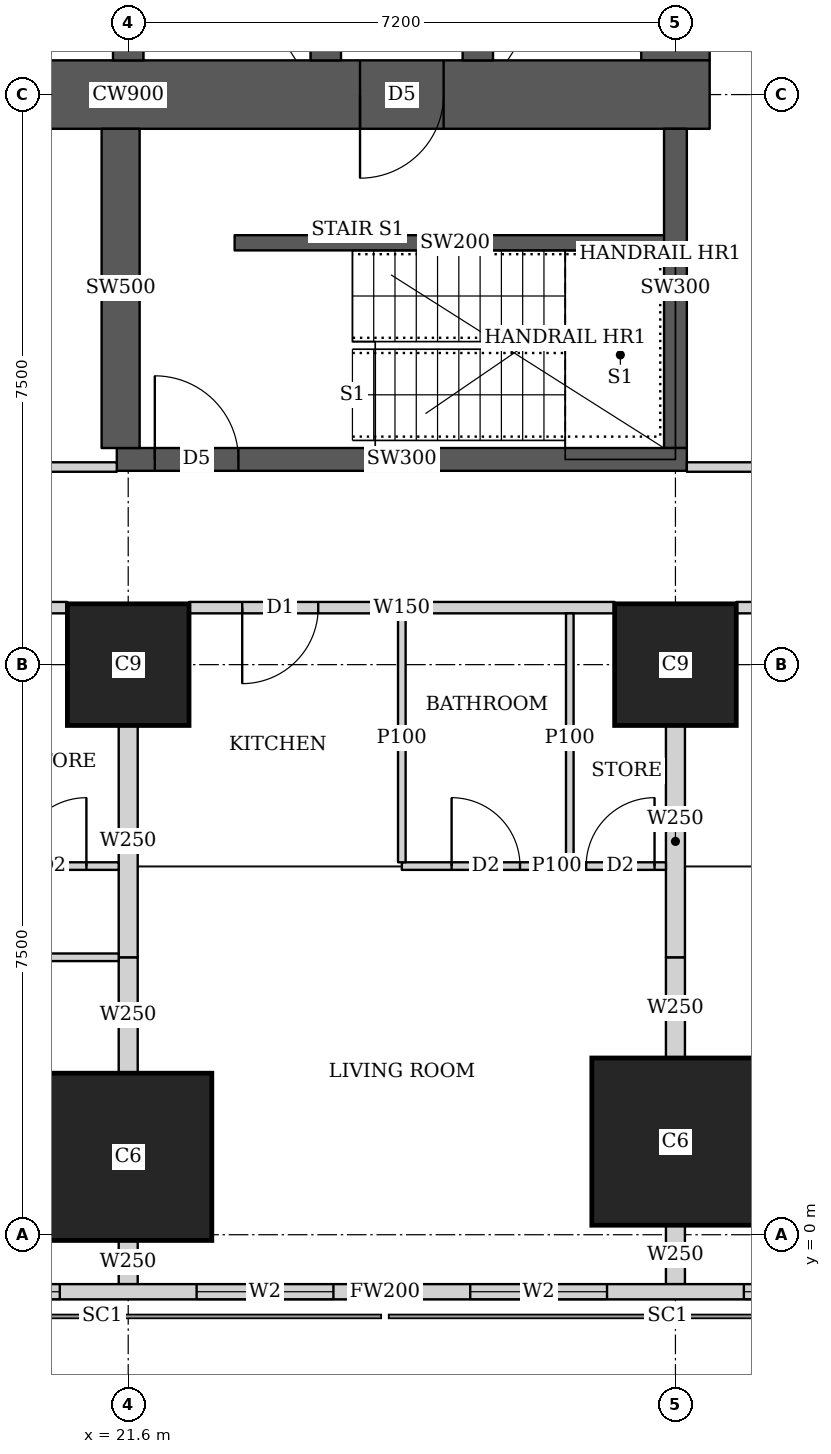
"""IFC4 building model, lengths in metres.
Left out: names, types, materials, properties, quantities, classifications, styles, units other than length and angle.
Written with IfcOpenShell. Run it as: python <this file> out.ifc"""

import sys

from ifc_helpers import new_model, si_unit, direction, frame, frame_2d, origin, origin_2d, place, context, subcontext, project, spatial, rectangle, extrude, element, fill, save


model = new_model("IFC4")
c1 = context("Model", 3, precision=1e-05, world=origin(), true_north=direction((0.0, 1.0)))
c2 = subcontext(c1, "Body", "Model", "MODEL_VIEW")
j1 = project(units=[si_unit("LENGTHUNIT", "METRE"), si_unit("PLANEANGLEUNIT", "RADIAN")], contexts=[c1])
p1 = place(None, origin())
s1 = spatial("IfcSite", under=j1, at=p1, CompositionType="ELEMENT")
p2 = place(p1, origin())
s2 = spatial("IfcBuilding", under=s1, at=p2, CompositionType="ELEMENT")
p3 = place(p2, frame((0.0, 0.0, 122.9)))
s3 = spatial("IfcBuildingStorey", under=s2, at=p3, CompositionType="ELEMENT", Elevation=122.9)
for number, where, z_axis, x_axis in (
    (1, (21.6, 1.025, 0.0), (0.0, 0.0, 1.0), (1.0, 0.0, 0.0)),
    (2, (28.8, 1.225, 0.0), (0.0, 0.0, 1.0), (1.0, 0.0, 0.0)),
):
    element("IfcColumn", number, at=place(p3, frame(where, z_axis=z_axis, x_axis=x_axis)), inside=s3, PredefinedType="COLUMN", context=c2, shape_type="SweptSolid", body=[
        extrude(rectangle(XDim=2.2, YDim=2.2, at=origin_2d()), origin(), (0.0, 0.0, 1.0), 3.75),
    ])
for number, where, z_axis, x_axis in (
    (3, (21.6, 7.5, 0.0), (0.0, 0.0, 1.0), (1.0, 0.0, 0.0)),
    (4, (28.8, 7.5, 0.0), (0.0, 0.0, 1.0), (1.0, 0.0, 0.0)),
):
    element("IfcColumn", number, at=place(p3, frame(where, z_axis=z_axis, x_axis=x_axis)), inside=s3, PredefinedType="COLUMN", context=c2, shape_type="SweptSolid", body=[
        extrude(rectangle(XDim=1.6, YDim=1.6, at=origin_2d()), origin(), (0.0, 0.0, 1.0), 3.75),
    ])
p4 = place(p3, frame((13.95, 15.0, 0.0), z_axis=(0.0, 0.0, 1.0), x_axis=(1.0, 0.0, 0.0)))
e5 = element("IfcWall", 5, at=p4, inside=s3, PredefinedType="SHEAR", context=c2, shape_type="SweptSolid", body=[
    extrude(rectangle(XDim=15.3, YDim=0.9, at=frame_2d((7.65, 0.0))), origin(), (0.0, 0.0, 1.0), 3.75),
])
p5 = place(p4, frame((4.45, 0.0, 0.0)))
e6 = element("IfcOpeningElement", 6, at=p5, cuts=e5, PredefinedType="OPENING", context=c2, shape_type="SweptSolid", body=[
    extrude(rectangle(XDim=1.8, YDim=2.1, at=frame_2d((0.9, 1.05))), frame((0.0, 0.46, 0.0), z_axis=(0.0, -1.0, 0.0), x_axis=(1.0, 0.0, 0.0)), (0.0, 0.0, 1.0), 0.92),
])
p6 = place(p4, frame((10.7, 0.0, 0.0)))
e7 = element("IfcOpeningElement", 7, at=p6, cuts=e5, PredefinedType="OPENING", context=c2, shape_type="SweptSolid", body=[
    extrude(rectangle(XDim=1.1, YDim=2.1, at=frame_2d((0.55, 1.05))), frame((0.0, 0.46, 0.0), z_axis=(0.0, -1.0, 0.0), x_axis=(1.0, 0.0, 0.0)), (0.0, 0.0, 1.0), 0.92),
])
p7 = place(p3, frame((28.8, 15.45, 0.0), z_axis=(0.0, 0.0, 1.0), x_axis=(0.0, 1.0, 0.0)))
e8 = element("IfcWall", 8, at=p7, inside=s3, PredefinedType="SHEAR", context=c2, shape_type="SweptSolid", body=[
    extrude(rectangle(XDim=14.1, YDim=0.9, at=frame_2d((7.05, 0.0))), origin(), (0.0, 0.0, 1.0), 3.75),
])
for number, where, z_axis, x_axis in (
    (9, (21.6, 15.45, 0.0), (0.0, 0.0, 1.0), (0.0, 1.0, 0.0)),
    (10, (24.2, 15.45, 0.0), (0.0, 0.0, 1.0), (0.0, 1.0, 0.0)),
):
    element("IfcWall", number, at=place(p3, frame(where, z_axis=z_axis, x_axis=x_axis)), inside=s3, PredefinedType="SHEAR", context=c2, shape_type="SweptSolid", body=[
        extrude(rectangle(XDim=14.1, YDim=0.4, at=frame_2d((7.05, 0.0))), origin(), (0.0, 0.0, 1.0), 3.75),
    ])
p8 = place(p3, frame((26.2, 15.45, 0.0), z_axis=(0.0, 0.0, 1.0), x_axis=(0.0, 1.0, 0.0)))
e11 = element("IfcWall", 11, at=p8, inside=s3, PredefinedType="SHEAR", context=c2, shape_type="SweptSolid", body=[
    extrude(rectangle(XDim=3.1, YDim=0.4, at=frame_2d((1.55, 0.0))), origin(), (0.0, 0.0, 1.0), 3.75),
])
p9 = place(p8, frame((0.825, 0.0, 0.0)))
e12 = element("IfcOpeningElement", 12, at=p9, cuts=e11, PredefinedType="OPENING", context=c2, shape_type="SweptSolid", body=[
    extrude(rectangle(XDim=1.2, YDim=2.1, at=frame_2d((0.6, 1.05))), frame((0.0, 0.21, 0.0), z_axis=(0.0, -1.0, 0.0), x_axis=(1.0, 0.0, 0.0)), (0.0, 0.0, 1.0), 0.42),
])
p10 = place(p3, frame((21.45, 10.2, 0.0), z_axis=(0.0, 0.0, 1.0), x_axis=(1.0, 0.0, 0.0)))
e13 = element("IfcWall", 13, at=p10, inside=s3, PredefinedType="SHEAR", context=c2, shape_type="SweptSolid", body=[
    extrude(rectangle(XDim=7.5, YDim=0.3, at=frame_2d((3.75, 0.0))), origin(), (0.0, 0.0, 1.0), 3.75),
])
p11 = place(p10, frame((0.5, 0.0, 0.0)))
e14 = element("IfcOpeningElement", 14, at=p11, cuts=e13, PredefinedType="OPENING", context=c2, shape_type="SweptSolid", body=[
    extrude(rectangle(XDim=1.1, YDim=2.1, at=frame_2d((0.55, 1.05))), frame((0.0, 0.16, 0.0), z_axis=(0.0, -1.0, 0.0), x_axis=(1.0, 0.0, 0.0)), (0.0, 0.0, 1.0), 0.32),
])
p12 = place(p3, frame((21.5, 10.35, 0.0), z_axis=(0.0, 0.0, 1.0), x_axis=(0.0, 1.0, 0.0)))
e15 = element("IfcWall", 15, at=p12, inside=s3, PredefinedType="SHEAR", context=c2, shape_type="SweptSolid", body=[
    extrude(rectangle(XDim=4.2, YDim=0.5, at=frame_2d((2.1, 0.0))), origin(), (0.0, 0.0, 1.0), 3.75),
])
p13 = place(p3, frame((28.8, 10.35, 0.0), z_axis=(0.0, 0.0, 1.0), x_axis=(0.0, 1.0, 0.0)))
e16 = element("IfcWall", 16, at=p13, inside=s3, PredefinedType="SHEAR", context=c2, shape_type="SweptSolid", body=[
    extrude(rectangle(XDim=4.2, YDim=0.3, at=frame_2d((2.1, 0.0))), origin(), (0.0, 0.0, 1.0), 3.75),
])
p14 = place(p3, frame((2.163, -0.75, 0.0), z_axis=(0.0, 0.0, 1.0), x_axis=(1.0, 0.0, 0.0)))
e17 = element("IfcWall", 17, at=p14, inside=s3, PredefinedType="SOLIDWALL", context=c2, shape_type="SweptSolid", body=[
    extrude(rectangle(XDim=45.628, YDim=0.2, at=frame_2d((22.814, 0.0))), origin(), (0.0, 0.0, 1.0), 3.5),
])
p15 = place(p14, frame((9.537, 0.0, 0.9)))
e18 = element("IfcOpeningElement", 18, at=p15, cuts=e17, PredefinedType="OPENING", context=c2, shape_type="SweptSolid", body=[
    extrude(rectangle(XDim=1.8, YDim=1.5, at=frame_2d((0.9, 0.75))), frame((0.0, 0.11, 0.0), z_axis=(0.0, -1.0, 0.0), x_axis=(1.0, 0.0, 0.0)), (0.0, 0.0, 1.0), 0.22),
])
p16 = place(p14, frame((13.137, 0.0, 0.9)))
e19 = element("IfcOpeningElement", 19, at=p16, cuts=e17, PredefinedType="OPENING", context=c2, shape_type="SweptSolid", body=[
    extrude(rectangle(XDim=1.8, YDim=1.5, at=frame_2d((0.9, 0.75))), frame((0.0, 0.11, 0.0), z_axis=(0.0, -1.0, 0.0), x_axis=(1.0, 0.0, 0.0)), (0.0, 0.0, 1.0), 0.22),
])
p17 = place(p14, frame((16.737, 0.0, 0.9)))
e20 = element("IfcOpeningElement", 20, at=p17, cuts=e17, PredefinedType="OPENING", context=c2, shape_type="SweptSolid", body=[
    extrude(rectangle(XDim=1.8, YDim=1.5, at=frame_2d((0.9, 0.75))), frame((0.0, 0.11, 0.0), z_axis=(0.0, -1.0, 0.0), x_axis=(1.0, 0.0, 0.0)), (0.0, 0.0, 1.0), 0.22),
])
p18 = place(p14, frame((20.337, 0.0, 0.9)))
e21 = element("IfcOpeningElement", 21, at=p18, cuts=e17, PredefinedType="OPENING", context=c2, shape_type="SweptSolid", body=[
    extrude(rectangle(XDim=1.8, YDim=1.5, at=frame_2d((0.9, 0.75))), frame((0.0, 0.11, 0.0), z_axis=(0.0, -1.0, 0.0), x_axis=(1.0, 0.0, 0.0)), (0.0, 0.0, 1.0), 0.22),
])
p19 = place(p14, frame((23.937, 0.0, 0.9)))
e22 = element("IfcOpeningElement", 22, at=p19, cuts=e17, PredefinedType="OPENING", context=c2, shape_type="SweptSolid", body=[
    extrude(rectangle(XDim=1.8, YDim=1.5, at=frame_2d((0.9, 0.75))), frame((0.0, 0.11, 0.0), z_axis=(0.0, -1.0, 0.0), x_axis=(1.0, 0.0, 0.0)), (0.0, 0.0, 1.0), 0.22),
])
p20 = place(p14, frame((27.537, 0.0, 0.9)))
e23 = element("IfcOpeningElement", 23, at=p20, cuts=e17, PredefinedType="OPENING", context=c2, shape_type="SweptSolid", body=[
    extrude(rectangle(XDim=1.8, YDim=1.5, at=frame_2d((0.9, 0.75))), frame((0.0, 0.11, 0.0), z_axis=(0.0, -1.0, 0.0), x_axis=(1.0, 0.0, 0.0)), (0.0, 0.0, 1.0), 0.22),
])
p21 = place(p14, frame((31.137, 0.0, 0.9)))
e24 = element("IfcOpeningElement", 24, at=p21, cuts=e17, PredefinedType="OPENING", context=c2, shape_type="SweptSolid", body=[
    extrude(rectangle(XDim=1.8, YDim=1.5, at=frame_2d((0.9, 0.75))), frame((0.0, 0.11, 0.0), z_axis=(0.0, -1.0, 0.0), x_axis=(1.0, 0.0, 0.0)), (0.0, 0.0, 1.0), 0.22),
])
p22 = place(p14, frame((34.737, 0.0, 0.9)))
e25 = element("IfcOpeningElement", 25, at=p22, cuts=e17, PredefinedType="OPENING", context=c2, shape_type="SweptSolid", body=[
    extrude(rectangle(XDim=1.8, YDim=1.5, at=frame_2d((0.9, 0.75))), frame((0.0, 0.11, 0.0), z_axis=(0.0, -1.0, 0.0), x_axis=(1.0, 0.0, 0.0)), (0.0, 0.0, 1.0), 0.22),
])
p23 = place(p3, frame((35.199, 8.25, 0.0), z_axis=(0.0, 0.0, 1.0), x_axis=(-1.0, 0.0, 0.0)))
e26 = element("IfcWall", 26, at=p23, inside=s3, PredefinedType="SOLIDWALL", context=c2, shape_type="SweptSolid", body=[
    extrude(rectangle(XDim=5.598, YDim=0.15, at=frame_2d((2.799, 0.0))), origin(), (0.0, 0.0, 1.0), 3.5),
])
p24 = place(p23, frame((3.899, 0.0, 0.0)))
e27 = element("IfcOpeningElement", 27, at=p24, cuts=e26, PredefinedType="OPENING", context=c2, shape_type="SweptSolid", body=[
    extrude(rectangle(XDim=1.0, YDim=2.1, at=frame_2d((0.5, 1.05))), frame((0.0, 0.085, 0.0), z_axis=(0.0, -1.0, 0.0), x_axis=(1.0, 0.0, 0.0)), (0.0, 0.0, 1.0), 0.17),
])
p25 = place(p3, frame((27.999, 8.25, 0.0), z_axis=(0.0, 0.0, 1.0), x_axis=(-1.0, 0.0, 0.0)))
e28 = element("IfcWall", 28, at=p25, inside=s3, PredefinedType="SOLIDWALL", context=c2, shape_type="SweptSolid", body=[
    extrude(rectangle(XDim=5.598, YDim=0.15, at=frame_2d((2.799, 0.0))), origin(), (0.0, 0.0, 1.0), 3.5),
])
p26 = place(p25, frame((3.899, 0.0, 0.0)))
e29 = element("IfcOpeningElement", 29, at=p26, cuts=e28, PredefinedType="OPENING", context=c2, shape_type="SweptSolid", body=[
    extrude(rectangle(XDim=1.0, YDim=2.1, at=frame_2d((0.5, 1.05))), frame((0.0, 0.085, 0.0), z_axis=(0.0, -1.0, 0.0), x_axis=(1.0, 0.0, 0.0)), (0.0, 0.0, 1.0), 0.17),
])
p27 = place(p3, frame((20.799, 8.25, 0.0), z_axis=(0.0, 0.0, 1.0), x_axis=(-1.0, 0.0, 0.0)))
e30 = element("IfcWall", 30, at=p27, inside=s3, PredefinedType="SOLIDWALL", context=c2, shape_type="SweptSolid", body=[
    extrude(rectangle(XDim=5.598, YDim=0.15, at=frame_2d((2.799, 0.0))), origin(), (0.0, 0.0, 1.0), 3.5),
])
p28 = place(p3, frame((21.475, 3.65, 0.0), z_axis=(0.0, 0.0, 1.0), x_axis=(-1.0, 0.0, 0.0)))
e31 = element("IfcWall", 31, at=p28, inside=s3, PredefinedType="PARTITIONING", context=c2, shape_type="SweptSolid", body=[
    extrude(rectangle(XDim=7.075, YDim=0.1, at=frame_2d((3.538, 0.0))), origin(), (0.0, 0.0, 1.0), 3.5),
])
p29 = place(p28, frame((5.975, 0.0, 0.0)))
e32 = element("IfcOpeningElement", 32, at=p29, cuts=e31, PredefinedType="OPENING", context=c2, shape_type="SweptSolid", body=[
    extrude(rectangle(XDim=0.9, YDim=2.1, at=frame_2d((0.45, 1.05))), frame((0.0, 0.06, 0.0), z_axis=(0.0, -1.0, 0.0), x_axis=(1.0, 0.0, 0.0)), (0.0, 0.0, 1.0), 0.12),
])
p30 = place(p28, frame((2.375, 0.0, 0.0)))
e33 = element("IfcOpeningElement", 33, at=p30, cuts=e31, PredefinedType="OPENING", context=c2, shape_type="SweptSolid", body=[
    extrude(rectangle(XDim=0.9, YDim=2.1, at=frame_2d((0.45, 1.05))), frame((0.0, 0.06, 0.0), z_axis=(0.0, -1.0, 0.0), x_axis=(1.0, 0.0, 0.0)), (0.0, 0.0, 1.0), 0.12),
])
p31 = place(p3, frame((21.475, 4.85, 0.0), z_axis=(0.0, 0.0, 1.0), x_axis=(-1.0, 0.0, 0.0)))
e34 = element("IfcWall", 34, at=p31, inside=s3, PredefinedType="PARTITIONING", context=c2, shape_type="SweptSolid", body=[
    extrude(rectangle(XDim=7.075, YDim=0.1, at=frame_2d((3.538, 0.0))), origin(), (0.0, 0.0, 1.0), 3.5),
])
p32 = place(p31, frame((5.52, 0.0, 0.0)))
e35 = element("IfcOpeningElement", 35, at=p32, cuts=e34, PredefinedType="OPENING", context=c2, shape_type="SweptSolid", body=[
    extrude(rectangle(XDim=0.9, YDim=2.1, at=frame_2d((0.45, 1.05))), frame((0.0, 0.06, 0.0), z_axis=(0.0, -1.0, 0.0), x_axis=(1.0, 0.0, 0.0)), (0.0, 0.0, 1.0), 0.12),
])
p33 = place(p31, frame((2.225, 0.0, 0.0)))
e36 = element("IfcOpeningElement", 36, at=p33, cuts=e34, PredefinedType="OPENING", context=c2, shape_type="SweptSolid", body=[
    extrude(rectangle(XDim=0.9, YDim=2.1, at=frame_2d((0.45, 1.05))), frame((0.0, 0.06, 0.0), z_axis=(0.0, -1.0, 0.0), x_axis=(1.0, 0.0, 0.0)), (0.0, 0.0, 1.0), 0.12),
])
p34 = place(p31, frame((3.72, 0.0, 0.0)))
e37 = element("IfcOpeningElement", 37, at=p34, cuts=e34, PredefinedType="OPENING", context=c2, shape_type="SweptSolid", body=[
    extrude(rectangle(XDim=0.9, YDim=2.1, at=frame_2d((0.45, 1.05))), frame((0.0, 0.06, 0.0), z_axis=(0.0, -1.0, 0.0), x_axis=(1.0, 0.0, 0.0)), (0.0, 0.0, 1.0), 0.12),
])
p35 = place(p31, frame((0.425, 0.0, 0.0)))
e38 = element("IfcOpeningElement", 38, at=p35, cuts=e34, PredefinedType="OPENING", context=c2, shape_type="SweptSolid", body=[
    extrude(rectangle(XDim=0.9, YDim=2.1, at=frame_2d((0.45, 1.05))), frame((0.0, 0.06, 0.0), z_axis=(0.0, -1.0, 0.0), x_axis=(1.0, 0.0, 0.0)), (0.0, 0.0, 1.0), 0.12),
])
p36 = place(p3, frame((28.675, 4.85, 0.0), z_axis=(0.0, 0.0, 1.0), x_axis=(-1.0, 0.0, 0.0)))
e39 = element("IfcWall", 39, at=p36, inside=s3, PredefinedType="PARTITIONING", context=c2, shape_type="SweptSolid", body=[
    extrude(rectangle(XDim=3.475, YDim=0.1, at=frame_2d((1.738, 0.0))), origin(), (0.0, 0.0, 1.0), 3.5),
])
p37 = place(p36, frame((1.92, 0.0, 0.0)))
e40 = element("IfcOpeningElement", 40, at=p37, cuts=e39, PredefinedType="OPENING", context=c2, shape_type="SweptSolid", body=[
    extrude(rectangle(XDim=0.9, YDim=2.1, at=frame_2d((0.45, 1.05))), frame((0.0, 0.06, 0.0), z_axis=(0.0, -1.0, 0.0), x_axis=(1.0, 0.0, 0.0)), (0.0, 0.0, 1.0), 0.12),
])
p38 = place(p36, frame((0.15, 0.0, 0.0)))
e41 = element("IfcOpeningElement", 41, at=p38, cuts=e39, PredefinedType="OPENING", context=c2, shape_type="SweptSolid", body=[
    extrude(rectangle(XDim=0.9, YDim=2.1, at=frame_2d((0.45, 1.05))), frame((0.0, 0.06, 0.0), z_axis=(0.0, -1.0, 0.0), x_axis=(1.0, 0.0, 0.0)), (0.0, 0.0, 1.0), 0.12),
])
for number, where, z_axis, x_axis in (
    (42, (25.2, 4.9, 0.0), (0.0, 0.0, 1.0), (0.0, 1.0, 0.0)),
    (43, (27.41, 4.9, 0.0), (0.0, 0.0, 1.0), (0.0, 1.0, 0.0)),
):
    element("IfcWall", number, at=place(p3, frame(where, z_axis=z_axis, x_axis=x_axis)), inside=s3, PredefinedType="PARTITIONING", context=c2, shape_type="SweptSolid", body=[
        extrude(rectangle(XDim=3.275, YDim=0.1, at=frame_2d((1.638, 0.0))), origin(), (0.0, 0.0, 1.0), 3.5),
    ])
p39 = place(p3, frame((21.6, -0.65, 0.0), z_axis=(0.0, 0.0, 1.0), x_axis=(0.0, 1.0, 0.0)))
e44 = element("IfcWall", 44, at=p39, inside=s3, PredefinedType="SOLIDWALL", context=c2, shape_type="SweptSolid", body=[
    extrude(rectangle(XDim=0.574, YDim=0.25, at=frame_2d((0.287, 0.0))), origin(), (0.0, 0.0, 1.0), 3.5),
])
p40 = place(p3, frame((21.6, 2.126, 0.0), z_axis=(0.0, 0.0, 1.0), x_axis=(0.0, 1.0, 0.0)))
e45 = element("IfcWall", 45, at=p40, inside=s3, PredefinedType="SOLIDWALL", context=c2, shape_type="SweptSolid", body=[
    extrude(rectangle(XDim=1.524, YDim=0.25, at=frame_2d((0.762, 0.0))), origin(), (0.0, 0.0, 1.0), 3.5),
])
p41 = place(p3, frame((21.6, 3.65, 0.0), z_axis=(0.0, 0.0, 1.0), x_axis=(0.0, 1.0, 0.0)))
e46 = element("IfcWall", 46, at=p41, inside=s3, PredefinedType="SOLIDWALL", context=c2, shape_type="SweptSolid", body=[
    extrude(rectangle(XDim=3.049, YDim=0.25, at=frame_2d((1.524, 0.0))), origin(), (0.0, 0.0, 1.0), 3.5),
])
p42 = place(p3, frame((28.8, -0.65, 0.0), z_axis=(0.0, 0.0, 1.0), x_axis=(0.0, 1.0, 0.0)))
e47 = element("IfcWall", 47, at=p42, inside=s3, PredefinedType="SOLIDWALL", context=c2, shape_type="SweptSolid", body=[
    extrude(rectangle(XDim=0.774, YDim=0.25, at=frame_2d((0.387, 0.0))), origin(), (0.0, 0.0, 1.0), 3.5),
])
p43 = place(p3, frame((28.8, 2.326, 0.0), z_axis=(0.0, 0.0, 1.0), x_axis=(0.0, 1.0, 0.0)))
e48 = element("IfcWall", 48, at=p43, inside=s3, PredefinedType="SOLIDWALL", context=c2, shape_type="SweptSolid", body=[
    extrude(rectangle(XDim=1.324, YDim=0.25, at=frame_2d((0.662, 0.0))), origin(), (0.0, 0.0, 1.0), 3.5),
])
p44 = place(p3, frame((28.8, 3.65, 0.0), z_axis=(0.0, 0.0, 1.0), x_axis=(0.0, 1.0, 0.0)))
e49 = element("IfcWall", 49, at=p44, inside=s3, PredefinedType="SOLIDWALL", context=c2, shape_type="SweptSolid", body=[
    extrude(rectangle(XDim=3.049, YDim=0.25, at=frame_2d((1.524, 0.0))), origin(), (0.0, 0.0, 1.0), 3.5),
])
p45 = place(p3, frame((10.163, 10.1, 0.0), z_axis=(0.0, 0.0, 1.0), x_axis=(1.0, 0.0, 0.0)))
e50 = element("IfcWall", 50, at=p45, inside=s3, PredefinedType="PARTITIONING", context=c2, shape_type="SweptSolid", body=[
    extrude(rectangle(XDim=11.287, YDim=0.125, at=frame_2d((5.644, 0.0))), origin(), (0.0, 0.0, 1.0), 3.5),
])
p46 = place(p45, frame((7.832, 0.0, 0.0)))
e51 = element("IfcOpeningElement", 51, at=p46, cuts=e50, PredefinedType="OPENING", context=c2, shape_type="SweptSolid", body=[
    extrude(rectangle(XDim=1.8, YDim=2.1, at=frame_2d((0.9, 1.05))), frame((0.0, 0.073, 0.0), z_axis=(0.0, -1.0, 0.0), x_axis=(1.0, 0.0, 0.0)), (0.0, 0.0, 1.0), 0.145),
])
p47 = place(p3, frame((28.95, 10.1, 0.0), z_axis=(0.0, 0.0, 1.0), x_axis=(1.0, 0.0, 0.0)))
e52 = element("IfcWall", 52, at=p47, inside=s3, PredefinedType="PARTITIONING", context=c2, shape_type="SweptSolid", body=[
    extrude(rectangle(XDim=9.188, YDim=0.125, at=frame_2d((4.594, 0.0))), origin(), (0.0, 0.0, 1.0), 3.5),
])
p48 = place(p3, frame((23.0, 13.05, 0.0), z_axis=(0.0, 0.0, 1.0), x_axis=(1.0, 0.0, 0.0)))
e53 = element("IfcWall", 53, at=p48, inside=s3, PredefinedType="SHEAR", context=c2, shape_type="SweptSolid", body=[
    extrude(rectangle(XDim=5.8, YDim=0.2, at=frame_2d((2.9, 0.0))), origin(), (0.0, 0.0, 1.0), 3.75),
])
p49 = place(p17, origin())
e54 = element("IfcWindow", 54, at=p49, inside=s3, PartitioningType="SINGLE_PANEL", PredefinedType="WINDOW", context=c2, shape_type="SweptSolid", body=[
    extrude(rectangle(XDim=1.8, YDim=1.5, at=frame_2d((0.9, 0.75))), frame((0.0, 0.03, 0.0), z_axis=(0.0, -1.0, 0.0), x_axis=(1.0, 0.0, 0.0)), (0.0, 0.0, 1.0), 0.06),
])
fill(e20, e54)
p50 = place(p18, origin())
e55 = element("IfcWindow", 55, at=p50, inside=s3, PartitioningType="SINGLE_PANEL", PredefinedType="WINDOW", context=c2, shape_type="SweptSolid", body=[
    extrude(rectangle(XDim=1.8, YDim=1.5, at=frame_2d((0.9, 0.75))), frame((0.0, 0.03, 0.0), z_axis=(0.0, -1.0, 0.0), x_axis=(1.0, 0.0, 0.0)), (0.0, 0.0, 1.0), 0.06),
])
fill(e21, e55)
p51 = place(p19, origin())
e56 = element("IfcWindow", 56, at=p51, inside=s3, PartitioningType="SINGLE_PANEL", PredefinedType="WINDOW", context=c2, shape_type="SweptSolid", body=[
    extrude(rectangle(XDim=1.8, YDim=1.5, at=frame_2d((0.9, 0.75))), frame((0.0, 0.03, 0.0), z_axis=(0.0, -1.0, 0.0), x_axis=(1.0, 0.0, 0.0)), (0.0, 0.0, 1.0), 0.06),
])
fill(e22, e56)
p52 = place(p20, origin())
e57 = element("IfcWindow", 57, at=p52, inside=s3, PartitioningType="SINGLE_PANEL", PredefinedType="WINDOW", context=c2, shape_type="SweptSolid", body=[
    extrude(rectangle(XDim=1.8, YDim=1.5, at=frame_2d((0.9, 0.75))), frame((0.0, 0.03, 0.0), z_axis=(0.0, -1.0, 0.0), x_axis=(1.0, 0.0, 0.0)), (0.0, 0.0, 1.0), 0.06),
])
fill(e23, e57)
p53 = place(p35, origin())
e58 = element("IfcDoor", 58, at=p53, inside=s3, OperationType="SINGLE_SWING_RIGHT", PredefinedType="DOOR", context=c2, shape_type="SweptSolid", body=[
    extrude(rectangle(XDim=0.9, YDim=2.1, at=frame_2d((0.45, 1.05))), frame((0.0, 0.025, 0.0), z_axis=(0.0, -1.0, 0.0), x_axis=(1.0, 0.0, 0.0)), (0.0, 0.0, 1.0), 0.05),
])
fill(e38, e58)
p54 = place(p37, origin())
e59 = element("IfcDoor", 59, at=p54, inside=s3, OperationType="SINGLE_SWING_LEFT", PredefinedType="DOOR", context=c2, shape_type="SweptSolid", body=[
    extrude(rectangle(XDim=0.9, YDim=2.1, at=frame_2d((0.45, 1.05))), frame((0.0, 0.025, 0.0), z_axis=(0.0, -1.0, 0.0), x_axis=(1.0, 0.0, 0.0)), (0.0, 0.0, 1.0), 0.05),
])
fill(e40, e59)
p55 = place(p38, origin())
e60 = element("IfcDoor", 60, at=p55, inside=s3, OperationType="SINGLE_SWING_RIGHT", PredefinedType="DOOR", context=c2, shape_type="SweptSolid", body=[
    extrude(rectangle(XDim=0.9, YDim=2.1, at=frame_2d((0.45, 1.05))), frame((0.0, 0.025, 0.0), z_axis=(0.0, -1.0, 0.0), x_axis=(1.0, 0.0, 0.0)), (0.0, 0.0, 1.0), 0.05),
])
fill(e41, e60)
p56 = place(p26, origin())
e61 = element("IfcDoor", 61, at=p56, inside=s3, OperationType="SINGLE_SWING_RIGHT", PredefinedType="DOOR", context=c2, shape_type="SweptSolid", body=[
    extrude(rectangle(XDim=1.0, YDim=2.1, at=frame_2d((0.5, 1.05))), frame((0.0, 0.025, 0.0), z_axis=(0.0, -1.0, 0.0), x_axis=(1.0, 0.0, 0.0)), (0.0, 0.0, 1.0), 0.05),
])
fill(e29, e61)
p57 = place(p6, origin())
e62 = element("IfcDoor", 62, at=p57, inside=s3, OperationType="SINGLE_SWING_RIGHT", PredefinedType="DOOR", context=c2, shape_type="SweptSolid", body=[
    extrude(rectangle(XDim=1.1, YDim=2.1, at=frame_2d((0.55, 1.05))), frame((0.0, 0.025, 0.0), z_axis=(0.0, -1.0, 0.0), x_axis=(1.0, 0.0, 0.0)), (0.0, 0.0, 1.0), 0.05),
])
fill(e7, e62)
p58 = place(p11, origin())
e63 = element("IfcDoor", 63, at=p58, inside=s3, OperationType="SINGLE_SWING_LEFT", PredefinedType="DOOR", context=c2, shape_type="SweptSolid", body=[
    extrude(rectangle(XDim=1.1, YDim=2.1, at=frame_2d((0.55, 1.05))), frame((0.0, 0.025, 0.0), z_axis=(0.0, -1.0, 0.0), x_axis=(1.0, 0.0, 0.0)), (0.0, 0.0, 1.0), 0.05),
])
fill(e14, e63)
save(model, sys.argv[1])
